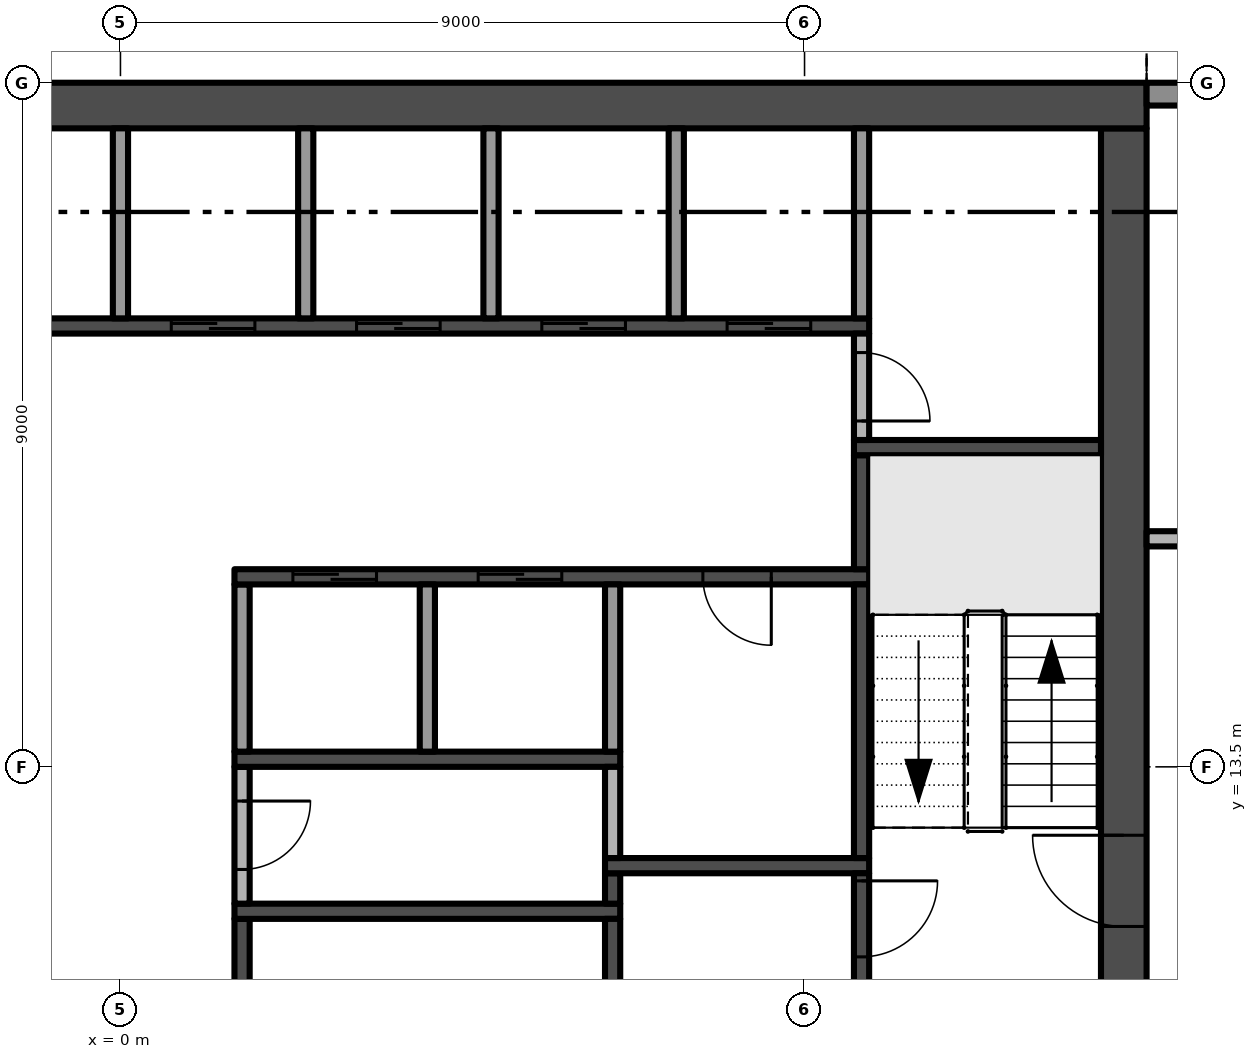
"""IFC4 building model, lengths in metres.
Left out: names, types, materials, properties, quantities, classifications, styles, units other than length and angle.
Written with IfcOpenShell. Run it as: python <this file> out.ifc"""

import sys

from ifc_helpers import new_model, si_unit, direction, frame, frame_2d, origin, place, context, subcontext, project, spatial, polyline, rectangle, outline, extrude, element, fill, save


model = new_model("IFC4")
c1 = context("Model", 3, precision=1e-05, world=origin(), true_north=direction((0.0, 1.0)))
c2 = subcontext(c1, "Body", "Model", "MODEL_VIEW")
j1 = project(units=[si_unit("LENGTHUNIT", "METRE"), si_unit("PLANEANGLEUNIT", "RADIAN")], contexts=[c1])
p1 = place(None, origin())
s1 = spatial("IfcSite", under=j1, at=p1, CompositionType="ELEMENT")
p2 = place(p1, origin())
s2 = spatial("IfcBuilding", under=s1, at=p2, CompositionType="ELEMENT")
p3 = place(p2, frame((0.0, 0.0, 261.6)))
s3 = spatial("IfcBuildingStorey", under=s2, at=p3, CompositionType="ELEMENT", Elevation=261.6)
p4 = place(p3, frame((13.2, 5.1, -0.3), z_axis=(0.0, 0.0, 1.0), x_axis=(0.0, 1.0, 0.0)))
e1 = element("IfcWall", 1, at=p4, inside=s3, PredefinedType="SHEAR", context=c2, shape_type="SweptSolid", body=[
    extrude(rectangle(XDim=16.8, YDim=0.6, at=frame_2d((8.4, 0.0))), origin(), (0.0, 0.0, 1.0), 3.8),
])
p5 = place(p4, frame((6.3, 0.0, 0.3)))
e2 = element("IfcOpeningElement", 2, at=p5, cuts=e1, PredefinedType="OPENING", context=c2, shape_type="SweptSolid", body=[
    extrude(rectangle(XDim=1.2, YDim=2.2, at=frame_2d((0.6, 1.1))), frame((0.0, 0.31, 0.0), z_axis=(0.0, -1.0, 0.0), x_axis=(1.0, 0.0, 0.0)), (0.0, 0.0, 1.0), 0.62),
])
p6 = place(p3, frame((13.5, 22.2, -0.3), z_axis=(0.0, 0.0, 1.0), x_axis=(-1.0, 0.0, 0.0)))
e3 = element("IfcWall", 3, at=p6, inside=s3, PredefinedType="SHEAR", context=c2, shape_type="SweptSolid", body=[
    extrude(rectangle(XDim=27.0, YDim=0.6, at=frame_2d((13.5, 0.0))), origin(), (0.0, 0.0, 1.0), 3.8),
])
p7 = place(p3, frame((13.5, 22.35, 0.0), z_axis=(0.0, 0.0, 1.0), x_axis=(1.0, 0.0, 0.0)))
e4 = element("IfcWall", 4, at=p7, inside=s3, PredefinedType="SOLIDWALL", context=c2, shape_type="SweptSolid", body=[
    extrude(rectangle(XDim=4.05, YDim=0.3, at=frame_2d((2.025, 0.0))), origin(), (0.0, 0.0, 1.0), 3.5),
])
p8 = place(p7, frame((0.55, 0.0, 0.0)))
e5 = element("IfcOpeningElement", 5, at=p8, cuts=e4, PredefinedType="OPENING", context=c2, shape_type="SweptSolid", body=[
    extrude(rectangle(XDim=3.2, YDim=2.4, at=frame_2d((1.6, 1.2))), frame((0.0, 0.16, 0.0), z_axis=(0.0, -1.0, 0.0), x_axis=(1.0, 0.0, 0.0)), (0.0, 0.0, 1.0), 0.32),
])
p9 = place(p3, origin())
e6 = element("IfcWall", 6, at=p9, inside=s3, PredefinedType="USERDEFINED", context=c2, shape_type="SweptSolid", body=[
    extrude(outline(polyline([(22.5, 23.451), (21.0, 23.115), (20.625, 23.1), (19.5, 23.231), (18.0, 23.755), (16.5, 24.488), (15.0, 25.149), (13.5, 25.485), (13.445, 25.241), (14.921, 24.91), (16.395, 24.261), (17.904, 23.524), (19.444, 22.986), (20.615, 22.849), (21.033, 22.866), (22.555, 23.208), (22.5, 23.451)])), origin(), (0.0, 0.0, 1.0), 0.9),
])
p10 = place(p3, frame((-9.85, 19.3, 0.0), z_axis=(0.0, 0.0, 1.0), x_axis=(1.0, 0.0, 0.0)))
e7 = element("IfcWall", 7, at=p10, inside=s3, PredefinedType="SHEAR", context=c2, shape_type="SweptSolid", body=[
    extrude(rectangle(XDim=19.7, YDim=0.2, at=frame_2d((9.85, 0.0))), origin(), (0.0, 0.0, 1.0), 3.5),
])
p11 = place(p10, frame((10.519, 0.0, 0.0)))
e8 = element("IfcOpeningElement", 8, at=p11, cuts=e7, PredefinedType="OPENING", context=c2, shape_type="SweptSolid", body=[
    extrude(rectangle(XDim=1.1, YDim=2.1, at=frame_2d((0.55, 1.05))), frame((0.0, 0.11, 0.0), z_axis=(0.0, -1.0, 0.0), x_axis=(1.0, 0.0, 0.0)), (0.0, 0.0, 1.0), 0.22),
])
p12 = place(p10, frame((12.956, 0.0, 0.0)))
e9 = element("IfcOpeningElement", 9, at=p12, cuts=e7, PredefinedType="OPENING", context=c2, shape_type="SweptSolid", body=[
    extrude(rectangle(XDim=1.1, YDim=2.1, at=frame_2d((0.55, 1.05))), frame((0.0, 0.11, 0.0), z_axis=(0.0, -1.0, 0.0), x_axis=(1.0, 0.0, 0.0)), (0.0, 0.0, 1.0), 0.22),
])
p13 = place(p10, frame((15.394, 0.0, 0.0)))
e10 = element("IfcOpeningElement", 10, at=p13, cuts=e7, PredefinedType="OPENING", context=c2, shape_type="SweptSolid", body=[
    extrude(rectangle(XDim=1.1, YDim=2.1, at=frame_2d((0.55, 1.05))), frame((0.0, 0.11, 0.0), z_axis=(0.0, -1.0, 0.0), x_axis=(1.0, 0.0, 0.0)), (0.0, 0.0, 1.0), 0.22),
])
p14 = place(p10, frame((17.831, 0.0, 0.0)))
e11 = element("IfcOpeningElement", 11, at=p14, cuts=e7, PredefinedType="OPENING", context=c2, shape_type="SweptSolid", body=[
    extrude(rectangle(XDim=1.1, YDim=2.1, at=frame_2d((0.55, 1.05))), frame((0.0, 0.11, 0.0), z_axis=(0.0, -1.0, 0.0), x_axis=(1.0, 0.0, 0.0)), (0.0, 0.0, 1.0), 0.22),
])
p15 = place(p10, frame((2.087, 0.0, 0.0)))
e12 = element("IfcOpeningElement", 12, at=p15, cuts=e7, PredefinedType="OPENING", context=c2, shape_type="SweptSolid", body=[
    extrude(rectangle(XDim=0.9, YDim=2.1, at=frame_2d((0.45, 1.05))), frame((0.0, 0.11, 0.0), z_axis=(0.0, -1.0, 0.0), x_axis=(1.0, 0.0, 0.0)), (0.0, 0.0, 1.0), 0.22),
])
p16 = place(p10, frame((6.963, 0.0, 0.0)))
e13 = element("IfcOpeningElement", 13, at=p16, cuts=e7, PredefinedType="OPENING", context=c2, shape_type="SweptSolid", body=[
    extrude(rectangle(XDim=0.9, YDim=2.1, at=frame_2d((0.45, 1.05))), frame((0.0, 0.11, 0.0), z_axis=(0.0, -1.0, 0.0), x_axis=(1.0, 0.0, 0.0)), (0.0, 0.0, 1.0), 0.22),
])
p17 = place(p3, frame((0.0, 19.4, 0.0), z_axis=(0.0, 0.0, 1.0), x_axis=(0.0, 1.0, 0.0)))
e14 = element("IfcWall", 14, at=p17, inside=s3, PredefinedType="PARTITIONING", context=c2, shape_type="SweptSolid", body=[
    extrude(rectangle(XDim=2.5, YDim=0.2, at=frame_2d((1.25, 0.0))), origin(), (0.0, 0.0, 1.0), 3.5),
])
p18 = place(p3, frame((1.6, 11.5, 0.0), z_axis=(0.0, 0.0, 1.0), x_axis=(0.0, -1.0, 0.0)))
e15 = element("IfcWall", 15, at=p18, inside=s3, PredefinedType="SHEAR", context=c2, shape_type="SweptSolid", body=[
    extrude(rectangle(XDim=6.4, YDim=0.2, at=frame_2d((3.2, 0.0))), origin(), (0.0, 0.0, 1.0), 3.5),
])
p19 = place(p18, frame((2.35, 0.0, 0.0)))
e16 = element("IfcOpeningElement", 16, at=p19, cuts=e15, PredefinedType="OPENING", context=c2, shape_type="SweptSolid", body=[
    extrude(rectangle(XDim=0.9, YDim=2.1, at=frame_2d((0.45, 1.05))), frame((0.0, 0.11, 0.0), z_axis=(0.0, -1.0, 0.0), x_axis=(1.0, 0.0, 0.0)), (0.0, 0.0, 1.0), 0.22),
])
p20 = place(p3, frame((1.5, 11.6, 0.0), z_axis=(0.0, 0.0, 1.0), x_axis=(1.0, 0.0, 0.0)))
e17 = element("IfcWall", 17, at=p20, inside=s3, PredefinedType="SHEAR", context=c2, shape_type="SweptSolid", body=[
    extrude(rectangle(XDim=5.075, YDim=0.2, at=frame_2d((2.538, 0.0))), origin(), (0.0, 0.0, 1.0), 3.5),
])
p21 = place(p3, frame((1.6, 13.5, 0.0), z_axis=(0.0, 0.0, 1.0), x_axis=(0.0, -1.0, 0.0)))
e18 = element("IfcWall", 18, at=p21, inside=s3, PredefinedType="PARTITIONING", context=c2, shape_type="SweptSolid", body=[
    extrude(rectangle(XDim=1.8, YDim=0.2, at=frame_2d((0.9, 0.0))), origin(), (0.0, 0.0, 1.0), 3.5),
])
p22 = place(p21, frame((0.45, 0.0, 0.0)))
e19 = element("IfcOpeningElement", 19, at=p22, cuts=e18, PredefinedType="OPENING", context=c2, shape_type="SweptSolid", body=[
    extrude(rectangle(XDim=0.9, YDim=2.1, at=frame_2d((0.45, 1.05))), frame((0.0, 0.11, 0.0), z_axis=(0.0, -1.0, 0.0), x_axis=(1.0, 0.0, 0.0)), (0.0, 0.0, 1.0), 0.22),
])
p23 = place(p3, frame((1.5, 13.6, 0.0), z_axis=(0.0, 0.0, 1.0), x_axis=(1.0, 0.0, 0.0)))
e20 = element("IfcWall", 20, at=p23, inside=s3, PredefinedType="SHEAR", context=c2, shape_type="SweptSolid", body=[
    extrude(rectangle(XDim=5.075, YDim=0.2, at=frame_2d((2.538, 0.0))), origin(), (0.0, 0.0, 1.0), 3.5),
])
p24 = place(p3, frame((1.6, 13.7, 0.0), z_axis=(0.0, 0.0, 1.0), x_axis=(0.0, 1.0, 0.0)))
e21 = element("IfcWall", 21, at=p24, inside=s3, PredefinedType="PARTITIONING", context=c2, shape_type="SweptSolid", body=[
    extrude(rectangle(XDim=2.2, YDim=0.2, at=frame_2d((1.1, 0.0))), origin(), (0.0, 0.0, 1.0), 3.5),
])
p25 = place(p3, frame((9.85, 16.0, 0.0), z_axis=(0.0, 0.0, 1.0), x_axis=(-1.0, 0.0, 0.0)))
e22 = element("IfcWall", 22, at=p25, inside=s3, PredefinedType="SHEAR", context=c2, shape_type="SweptSolid", body=[
    extrude(rectangle(XDim=8.35, YDim=0.2, at=frame_2d((4.175, 0.0))), origin(), (0.0, 0.0, 1.0), 3.5),
])
p26 = place(p25, frame((6.481, 0.0, 0.0)))
e23 = element("IfcOpeningElement", 23, at=p26, cuts=e22, PredefinedType="OPENING", context=c2, shape_type="SweptSolid", body=[
    extrude(rectangle(XDim=1.1, YDim=2.1, at=frame_2d((0.55, 1.05))), frame((0.0, 0.11, 0.0), z_axis=(0.0, -1.0, 0.0), x_axis=(1.0, 0.0, 0.0)), (0.0, 0.0, 1.0), 0.22),
])
p27 = place(p25, frame((4.044, 0.0, 0.0)))
e24 = element("IfcOpeningElement", 24, at=p27, cuts=e22, PredefinedType="OPENING", context=c2, shape_type="SweptSolid", body=[
    extrude(rectangle(XDim=1.1, YDim=2.1, at=frame_2d((0.55, 1.05))), frame((0.0, 0.11, 0.0), z_axis=(0.0, -1.0, 0.0), x_axis=(1.0, 0.0, 0.0)), (0.0, 0.0, 1.0), 0.22),
])
p28 = place(p25, frame((1.288, 0.0, 0.0)))
e25 = element("IfcOpeningElement", 25, at=p28, cuts=e22, PredefinedType="OPENING", context=c2, shape_type="SweptSolid", body=[
    extrude(rectangle(XDim=0.9, YDim=2.1, at=frame_2d((0.45, 1.05))), frame((0.0, 0.11, 0.0), z_axis=(0.0, -1.0, 0.0), x_axis=(1.0, 0.0, 0.0)), (0.0, 0.0, 1.0), 0.22),
])
p29 = place(p3, frame((2.438, 19.4, 0.0), z_axis=(0.0, 0.0, 1.0), x_axis=(0.0, 1.0, 0.0)))
e26 = element("IfcWall", 26, at=p29, inside=s3, PredefinedType="PARTITIONING", context=c2, shape_type="SweptSolid", body=[
    extrude(rectangle(XDim=2.5, YDim=0.2, at=frame_2d((1.25, 0.0))), origin(), (0.0, 0.0, 1.0), 3.5),
])
p30 = place(p3, frame((4.037, 13.7, 0.0), z_axis=(0.0, 0.0, 1.0), x_axis=(0.0, 1.0, 0.0)))
e27 = element("IfcWall", 27, at=p30, inside=s3, PredefinedType="PARTITIONING", context=c2, shape_type="SweptSolid", body=[
    extrude(rectangle(XDim=2.2, YDim=0.2, at=frame_2d((1.1, 0.0))), origin(), (0.0, 0.0, 1.0), 3.5),
])
p31 = place(p3, frame((4.875, 19.4, 0.0), z_axis=(0.0, 0.0, 1.0), x_axis=(0.0, 1.0, 0.0)))
e28 = element("IfcWall", 28, at=p31, inside=s3, PredefinedType="PARTITIONING", context=c2, shape_type="SweptSolid", body=[
    extrude(rectangle(XDim=2.5, YDim=0.2, at=frame_2d((1.25, 0.0))), origin(), (0.0, 0.0, 1.0), 3.5),
])
p32 = place(p3, frame((6.475, 5.1, 0.0), z_axis=(0.0, 0.0, 1.0), x_axis=(0.0, 1.0, 0.0)))
e29 = element("IfcWall", 29, at=p32, inside=s3, PredefinedType="SHEAR", context=c2, shape_type="SweptSolid", body=[
    extrude(rectangle(XDim=6.4, YDim=0.2, at=frame_2d((3.2, 0.0))), origin(), (0.0, 0.0, 1.0), 3.5),
])
p33 = place(p3, frame((6.475, 11.7, 0.0), z_axis=(0.0, 0.0, 1.0), x_axis=(0.0, 1.0, 0.0)))
e30 = element("IfcWall", 30, at=p33, inside=s3, PredefinedType="SHEAR", context=c2, shape_type="SweptSolid", body=[
    extrude(rectangle(XDim=0.4, YDim=0.2, at=frame_2d((0.2, 0.0))), origin(), (0.0, 0.0, 1.0), 3.5),
])
p34 = place(p3, frame((6.375, 12.2, 0.0), z_axis=(0.0, 0.0, 1.0), x_axis=(1.0, 0.0, 0.0)))
e31 = element("IfcWall", 31, at=p34, inside=s3, PredefinedType="SHEAR", context=c2, shape_type="SweptSolid", body=[
    extrude(rectangle(XDim=3.475, YDim=0.2, at=frame_2d((1.738, 0.0))), origin(), (0.0, 0.0, 1.0), 3.5),
])
p35 = place(p3, frame((6.475, 12.3, 0.0), z_axis=(0.0, 0.0, 1.0), x_axis=(0.0, 1.0, 0.0)))
e32 = element("IfcWall", 32, at=p35, inside=s3, PredefinedType="PARTITIONING", context=c2, shape_type="SweptSolid", body=[
    extrude(rectangle(XDim=1.2, YDim=0.2, at=frame_2d((0.6, 0.0))), origin(), (0.0, 0.0, 1.0), 3.5),
])
p36 = place(p3, frame((6.475, 13.7, 0.0), z_axis=(0.0, 0.0, 1.0), x_axis=(0.0, 1.0, 0.0)))
e33 = element("IfcWall", 33, at=p36, inside=s3, PredefinedType="PARTITIONING", context=c2, shape_type="SweptSolid", body=[
    extrude(rectangle(XDim=2.2, YDim=0.2, at=frame_2d((1.1, 0.0))), origin(), (0.0, 0.0, 1.0), 3.5),
])
p37 = place(p3, frame((7.312, 19.4, 0.0), z_axis=(0.0, 0.0, 1.0), x_axis=(0.0, 1.0, 0.0)))
e34 = element("IfcWall", 34, at=p37, inside=s3, PredefinedType="PARTITIONING", context=c2, shape_type="SweptSolid", body=[
    extrude(rectangle(XDim=2.5, YDim=0.2, at=frame_2d((1.25, 0.0))), origin(), (0.0, 0.0, 1.0), 3.5),
])
p38 = place(p3, frame((9.75, 12.1, 0.0), z_axis=(0.0, 0.0, 1.0), x_axis=(0.0, -1.0, 0.0)))
e35 = element("IfcWall", 35, at=p38, inside=s3, PredefinedType="SHEAR", context=c2, shape_type="SweptSolid", body=[
    extrude(rectangle(XDim=1.9, YDim=0.2, at=frame_2d((0.95, 0.0))), origin(), (0.0, 0.0, 1.0), 3.5),
])
p39 = place(p38, frame((0.1, 0.0, 0.0)))
e36 = element("IfcOpeningElement", 36, at=p39, cuts=e35, PredefinedType="OPENING", context=c2, shape_type="SweptSolid", body=[
    extrude(rectangle(XDim=1.0, YDim=2.2, at=frame_2d((0.5, 1.1))), frame((0.0, 0.11, 0.0), z_axis=(0.0, -1.0, 0.0), x_axis=(1.0, 0.0, 0.0)), (0.0, 0.0, 1.0), 0.22),
])
p40 = place(p3, frame((9.75, 12.3, 0.0), z_axis=(0.0, 0.0, 1.0), x_axis=(0.0, 1.0, 0.0)))
e37 = element("IfcWall", 37, at=p40, inside=s3, PredefinedType="SHEAR", context=c2, shape_type="SweptSolid", body=[
    extrude(rectangle(XDim=3.6, YDim=0.2, at=frame_2d((1.8, 0.0))), origin(), (0.0, 0.0, 1.0), 3.5),
])
p41 = place(p3, frame((9.75, 16.1, 0.0), z_axis=(0.0, 0.0, 1.0), x_axis=(0.0, 1.0, 0.0)))
e38 = element("IfcWall", 38, at=p41, inside=s3, PredefinedType="SHEAR", context=c2, shape_type="SweptSolid", body=[
    extrude(rectangle(XDim=1.5, YDim=0.2, at=frame_2d((0.75, 0.0))), origin(), (0.0, 0.0, 1.0), 3.5),
])
p42 = place(p3, frame((9.65, 17.7, 0.0), z_axis=(0.0, 0.0, 1.0), x_axis=(1.0, 0.0, 0.0)))
e39 = element("IfcWall", 39, at=p42, inside=s3, PredefinedType="SHEAR", context=c2, shape_type="SweptSolid", body=[
    extrude(rectangle(XDim=3.25, YDim=0.2, at=frame_2d((1.625, 0.0))), origin(), (0.0, 0.0, 1.0), 3.5),
])
p43 = place(p3, frame((9.75, 19.2, 0.0), z_axis=(0.0, 0.0, 1.0), x_axis=(0.0, -1.0, 0.0)))
e40 = element("IfcWall", 40, at=p43, inside=s3, PredefinedType="PARTITIONING", context=c2, shape_type="SweptSolid", body=[
    extrude(rectangle(XDim=1.4, YDim=0.2, at=frame_2d((0.7, 0.0))), origin(), (0.0, 0.0, 1.0), 3.5),
])
p44 = place(p43, frame((0.25, 0.0, 0.0)))
e41 = element("IfcOpeningElement", 41, at=p44, cuts=e40, PredefinedType="OPENING", context=c2, shape_type="SweptSolid", body=[
    extrude(rectangle(XDim=0.9, YDim=2.1, at=frame_2d((0.45, 1.05))), frame((0.0, 0.11, 0.0), z_axis=(0.0, -1.0, 0.0), x_axis=(1.0, 0.0, 0.0)), (0.0, 0.0, 1.0), 0.22),
])
p45 = place(p3, frame((9.75, 19.4, 0.0), z_axis=(0.0, 0.0, 1.0), x_axis=(0.0, 1.0, 0.0)))
e42 = element("IfcWall", 42, at=p45, inside=s3, PredefinedType="PARTITIONING", context=c2, shape_type="SweptSolid", body=[
    extrude(rectangle(XDim=2.5, YDim=0.2, at=frame_2d((1.25, 0.0))), origin(), (0.0, 0.0, 1.0), 3.5),
])
p46 = place(p3, frame((13.5, 16.5, 0.0), z_axis=(0.0, 0.0, 1.0), x_axis=(1.0, 0.0, 0.0)))
e43 = element("IfcWall", 43, at=p46, inside=s3, PredefinedType="PARTITIONING", context=c2, shape_type="SweptSolid", body=[
    extrude(rectangle(XDim=3.825, YDim=0.2, at=frame_2d((1.913, 0.0))), origin(), (0.0, 0.0, 1.0), 3.5),
])
p47 = place(p46, frame((1.55, 0.0, 0.0)))
e44 = element("IfcOpeningElement", 44, at=p47, cuts=e43, PredefinedType="OPENING", context=c2, shape_type="SweptSolid", body=[
    extrude(rectangle(XDim=0.9, YDim=2.1, at=frame_2d((0.45, 1.05))), frame((0.0, 0.11, 0.0), z_axis=(0.0, -1.0, 0.0), x_axis=(1.0, 0.0, 0.0)), (0.0, 0.0, 1.0), 0.22),
])
p48 = place(p5, frame((1.2, 0.0, 0.0), z_axis=(0.0, 0.0, 1.0), x_axis=(-1.0, 0.0, 0.0)))
e45 = element("IfcDoor", 45, at=p48, inside=s3, OperationType="SINGLE_SWING_LEFT", PredefinedType="DOOR", context=c2, shape_type="SweptSolid", body=[
    extrude(rectangle(XDim=1.2, YDim=2.2, at=frame_2d((0.6, 1.1))), frame((0.0, 0.025, 0.0), z_axis=(0.0, -1.0, 0.0), x_axis=(1.0, 0.0, 0.0)), (0.0, 0.0, 1.0), 0.05),
])
fill(e2, e45)
p49 = place(p39, origin())
e46 = element("IfcDoor", 46, at=p49, inside=s3, OperationType="SINGLE_SWING_LEFT", PredefinedType="DOOR", context=c2, shape_type="SweptSolid", body=[
    extrude(rectangle(XDim=1.0, YDim=2.2, at=frame_2d((0.5, 1.1))), frame((0.0, 0.025, 0.0), z_axis=(0.0, -1.0, 0.0), x_axis=(1.0, 0.0, 0.0)), (0.0, 0.0, 1.0), 0.05),
])
fill(e36, e46)
p50 = place(p11, origin())
e47 = element("IfcDoor", 47, at=p50, inside=s3, OperationType="SLIDING_TO_RIGHT", PredefinedType="DOOR", context=c2, shape_type="SweptSolid", body=[
    extrude(rectangle(XDim=1.1, YDim=2.1, at=frame_2d((0.55, 1.05))), frame((0.0, 0.025, 0.0), z_axis=(0.0, -1.0, 0.0), x_axis=(1.0, 0.0, 0.0)), (0.0, 0.0, 1.0), 0.05),
])
fill(e8, e47)
p51 = place(p12, origin())
e48 = element("IfcDoor", 48, at=p51, inside=s3, OperationType="SLIDING_TO_RIGHT", PredefinedType="DOOR", context=c2, shape_type="SweptSolid", body=[
    extrude(rectangle(XDim=1.1, YDim=2.1, at=frame_2d((0.55, 1.05))), frame((0.0, 0.025, 0.0), z_axis=(0.0, -1.0, 0.0), x_axis=(1.0, 0.0, 0.0)), (0.0, 0.0, 1.0), 0.05),
])
fill(e9, e48)
p52 = place(p13, origin())
e49 = element("IfcDoor", 49, at=p52, inside=s3, OperationType="SLIDING_TO_RIGHT", PredefinedType="DOOR", context=c2, shape_type="SweptSolid", body=[
    extrude(rectangle(XDim=1.1, YDim=2.1, at=frame_2d((0.55, 1.05))), frame((0.0, 0.025, 0.0), z_axis=(0.0, -1.0, 0.0), x_axis=(1.0, 0.0, 0.0)), (0.0, 0.0, 1.0), 0.05),
])
fill(e10, e49)
p53 = place(p14, origin())
e50 = element("IfcDoor", 50, at=p53, inside=s3, OperationType="SLIDING_TO_RIGHT", PredefinedType="DOOR", context=c2, shape_type="SweptSolid", body=[
    extrude(rectangle(XDim=1.1, YDim=2.1, at=frame_2d((0.55, 1.05))), frame((0.0, 0.025, 0.0), z_axis=(0.0, -1.0, 0.0), x_axis=(1.0, 0.0, 0.0)), (0.0, 0.0, 1.0), 0.05),
])
fill(e11, e50)
p54 = place(p26, origin())
e51 = element("IfcDoor", 51, at=p54, inside=s3, OperationType="SLIDING_TO_RIGHT", PredefinedType="DOOR", context=c2, shape_type="SweptSolid", body=[
    extrude(rectangle(XDim=1.1, YDim=2.1, at=frame_2d((0.55, 1.05))), frame((0.0, 0.025, 0.0), z_axis=(0.0, -1.0, 0.0), x_axis=(1.0, 0.0, 0.0)), (0.0, 0.0, 1.0), 0.05),
])
fill(e23, e51)
p55 = place(p27, origin())
e52 = element("IfcDoor", 52, at=p55, inside=s3, OperationType="SLIDING_TO_RIGHT", PredefinedType="DOOR", context=c2, shape_type="SweptSolid", body=[
    extrude(rectangle(XDim=1.1, YDim=2.1, at=frame_2d((0.55, 1.05))), frame((0.0, 0.025, 0.0), z_axis=(0.0, -1.0, 0.0), x_axis=(1.0, 0.0, 0.0)), (0.0, 0.0, 1.0), 0.05),
])
fill(e24, e52)
p56 = place(p22, origin())
e53 = element("IfcDoor", 53, at=p56, inside=s3, OperationType="SINGLE_SWING_LEFT", PredefinedType="DOOR", context=c2, shape_type="SweptSolid", body=[
    extrude(rectangle(XDim=0.9, YDim=2.1, at=frame_2d((0.45, 1.05))), frame((0.0, 0.025, 0.0), z_axis=(0.0, -1.0, 0.0), x_axis=(1.0, 0.0, 0.0)), (0.0, 0.0, 1.0), 0.05),
])
fill(e19, e53)
p57 = place(p28, origin())
e54 = element("IfcDoor", 54, at=p57, inside=s3, OperationType="SINGLE_SWING_LEFT", PredefinedType="DOOR", context=c2, shape_type="SweptSolid", body=[
    extrude(rectangle(XDim=0.9, YDim=2.1, at=frame_2d((0.45, 1.05))), frame((0.0, 0.025, 0.0), z_axis=(0.0, -1.0, 0.0), x_axis=(1.0, 0.0, 0.0)), (0.0, 0.0, 1.0), 0.05),
])
fill(e25, e54)
p58 = place(p44, origin())
e55 = element("IfcDoor", 55, at=p58, inside=s3, OperationType="SINGLE_SWING_RIGHT", PredefinedType="DOOR", context=c2, shape_type="SweptSolid", body=[
    extrude(rectangle(XDim=0.9, YDim=2.1, at=frame_2d((0.45, 1.05))), frame((0.0, 0.025, 0.0), z_axis=(0.0, -1.0, 0.0), x_axis=(1.0, 0.0, 0.0)), (0.0, 0.0, 1.0), 0.05),
])
fill(e41, e55)
save(model, sys.argv[1])
